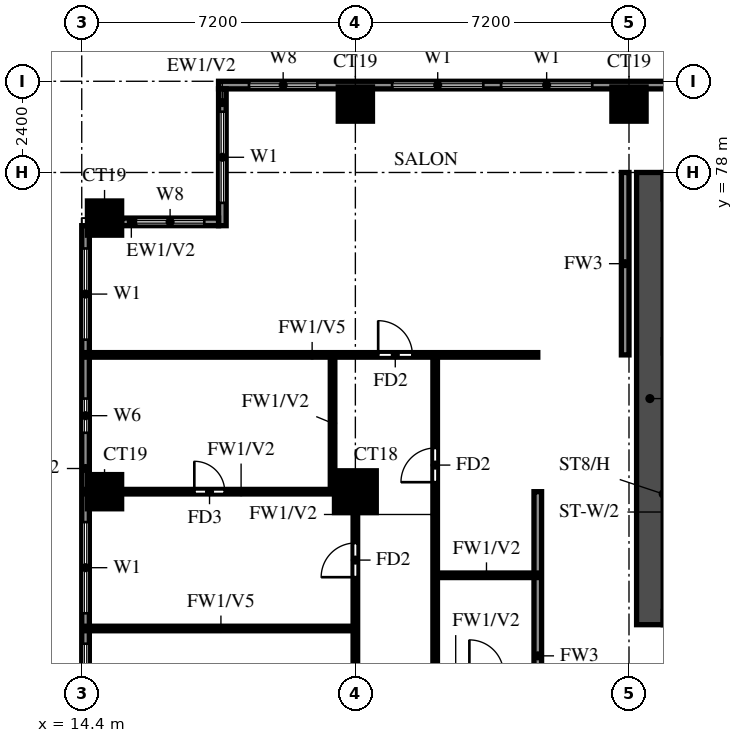
"""IFC4 building model, lengths in metres.
Left out: names, types, materials, properties, quantities, classifications, styles, units other than length and angle.
Written with IfcOpenShell. Run it as: python <this file> out.ifc"""

import sys

from ifc_helpers import new_model, si_unit, direction, frame, frame_2d, origin, origin_2d, place, context, subcontext, project, spatial, rectangle, extrude, source, transform, mapped, element, fill, save


model = new_model("IFC4")
c1 = context("Model", 3, precision=1e-05, world=origin(), true_north=direction((0.0, 1.0)))
c2 = subcontext(c1, "Body", "Model", "MODEL_VIEW")
j1 = project(units=[si_unit("LENGTHUNIT", "METRE"), si_unit("PLANEANGLEUNIT", "RADIAN")], contexts=[c1])
p1 = place(None, origin())
s1 = spatial("IfcSite", under=j1, at=p1, CompositionType="ELEMENT")
p2 = place(p1, origin())
s2 = spatial("IfcBuilding", under=s1, at=p2, CompositionType="ELEMENT")
p3 = place(p2, frame((0.0, 0.0, 120.0)))
s3 = spatial("IfcBuildingStorey", under=s2, at=p3, CompositionType="ELEMENT", Elevation=120.0)
m1 = source(origin(), c2, "Body", "SweptSolid", [
    extrude(rectangle(XDim=0.9, YDim=0.9, at=origin_2d()), origin(), (0.0, 0.0, 1.0), 3.2),
])
p4 = place(p3, frame((15.0, 69.6, 0.0), z_axis=(0.0, 0.0, 1.0), x_axis=(1.0, 0.0, 0.0)))
e1 = element("IfcColumn", 1, at=p4, inside=s3, PredefinedType="COLUMN", context=c2, shape_type="MappedRepresentation", body=[
    mapped(m1, transform((0.0, 0.0, 0.0))),
])
m2 = source(origin(), c2, "Body", "SweptSolid", [
    extrude(rectangle(XDim=1.1, YDim=1.1, at=origin_2d()), origin(), (0.0, 0.0, 1.0), 3.2),
])
p5 = place(p3, frame((21.6, 69.6, 0.0), z_axis=(0.0, 0.0, 1.0), x_axis=(1.0, 0.0, 0.0)))
e2 = element("IfcColumn", 2, at=p5, inside=s3, PredefinedType="COLUMN", context=c2, shape_type="MappedRepresentation", body=[
    mapped(m2, transform((0.0, 0.0, 0.0))),
])
for number, where, z_axis, x_axis in (
    (3, (15.0, 76.8, 0.0), (0.0, 0.0, 1.0), (1.0, 0.0, 0.0)),
    (4, (21.6, 79.8, 0.0), (0.0, 0.0, 1.0), (1.0, 0.0, 0.0)),
    (5, (28.8, 79.8, 0.0), (0.0, 0.0, 1.0), (1.0, 0.0, 0.0)),
):
    element("IfcColumn", number, at=place(p3, frame(where, z_axis=z_axis, x_axis=x_axis)), inside=s3, PredefinedType="COLUMN", context=c2, shape_type="MappedRepresentation", body=[
        mapped(m1, transform((0.0, 0.0, 0.0))),
    ])
p6 = place(p3, frame((29.35, 66.1, 0.0), z_axis=(0.0, 0.0, 1.0), x_axis=(0.0, 1.0, 0.0)))
e6 = element("IfcWall", 6, at=p6, inside=s3, PredefinedType="SHEAR", context=c2, shape_type="SweptSolid", body=[
    extrude(rectangle(XDim=11.9, YDim=0.7, at=frame_2d((5.95, 0.0))), origin(), (0.0, 0.0, 1.0), 3.2),
])
p7 = place(p3, frame((82.6, 80.3, 0.0), z_axis=(0.0, 0.0, 1.0), x_axis=(-1.0, 0.0, 0.0)))
e7 = element("IfcWall", 7, at=p7, inside=s3, PredefinedType="SOLIDWALL", context=c2, shape_type="SweptSolid", body=[
    extrude(rectangle(XDim=64.6, YDim=0.2, at=frame_2d((32.3, 0.0))), origin(), (0.0, 0.0, 1.0), 3.2),
])
p8 = place(p7, frame((7.9, 0.0, 0.0)))
e8 = element("IfcOpeningElement", 8, at=p8, cuts=e7, PredefinedType="OPENING", context=c2, shape_type="SweptSolid", body=[
    extrude(rectangle(XDim=1.8, YDim=2.4, at=frame_2d((0.9, 1.2))), frame((0.0, 0.11, 0.0), z_axis=(0.0, -1.0, 0.0), x_axis=(1.0, 0.0, 0.0)), (0.0, 0.0, 1.0), 0.22),
])
p9 = place(p7, frame((54.767, 0.0, 0.6)))
e9 = element("IfcOpeningElement", 9, at=p9, cuts=e7, PredefinedType="OPENING", context=c2, shape_type="SweptSolid", body=[
    extrude(rectangle(XDim=2.4, YDim=2.4, at=frame_2d((1.2, 1.2))), frame((0.0, 0.11, 0.0), z_axis=(0.0, -1.0, 0.0), x_axis=(1.0, 0.0, 0.0)), (0.0, 0.0, 1.0), 0.22),
])
p10 = place(p7, frame((57.633, 0.0, 0.6)))
e10 = element("IfcOpeningElement", 10, at=p10, cuts=e7, PredefinedType="OPENING", context=c2, shape_type="SweptSolid", body=[
    extrude(rectangle(XDim=2.4, YDim=2.4, at=frame_2d((1.2, 1.2))), frame((0.0, 0.11, 0.0), z_axis=(0.0, -1.0, 0.0), x_axis=(1.0, 0.0, 0.0)), (0.0, 0.0, 1.0), 0.22),
])
p11 = place(p7, frame((62.0, 0.0, 0.6)))
e11 = element("IfcOpeningElement", 11, at=p11, cuts=e7, PredefinedType="OPENING", context=c2, shape_type="SweptSolid", body=[
    extrude(rectangle(XDim=1.8, YDim=2.4, at=frame_2d((0.9, 1.2))), frame((0.0, 0.11, 0.0), z_axis=(0.0, -1.0, 0.0), x_axis=(1.0, 0.0, 0.0)), (0.0, 0.0, 1.0), 0.22),
])
p12 = place(p7, frame((0.7, 0.0, 0.6)))
e12 = element("IfcOpeningElement", 12, at=p12, cuts=e7, PredefinedType="OPENING", context=c2, shape_type="SweptSolid", body=[
    extrude(rectangle(XDim=1.8, YDim=2.4, at=frame_2d((0.9, 1.2))), frame((0.0, 0.11, 0.0), z_axis=(0.0, -1.0, 0.0), x_axis=(1.0, 0.0, 0.0)), (0.0, 0.0, 1.0), 0.22),
])
p13 = place(p7, frame((3.9, 0.0, 0.6)))
e13 = element("IfcOpeningElement", 13, at=p13, cuts=e7, PredefinedType="OPENING", context=c2, shape_type="SweptSolid", body=[
    extrude(rectangle(XDim=1.8, YDim=2.4, at=frame_2d((0.9, 1.2))), frame((0.0, 0.11, 0.0), z_axis=(0.0, -1.0, 0.0), x_axis=(1.0, 0.0, 0.0)), (0.0, 0.0, 1.0), 0.22),
])
p14 = place(p7, frame((6.55, 0.0, 0.6)))
e14 = element("IfcOpeningElement", 14, at=p14, cuts=e7, PredefinedType="OPENING", context=c2, shape_type="SweptSolid", body=[
    extrude(rectangle(XDim=0.9, YDim=2.4, at=frame_2d((0.45, 1.2))), frame((0.0, 0.11, 0.0), z_axis=(0.0, -1.0, 0.0), x_axis=(1.0, 0.0, 0.0)), (0.0, 0.0, 1.0), 0.22),
])
p15 = place(p3, frame((18.1, 80.2, 0.0), z_axis=(0.0, 0.0, 1.0), x_axis=(0.0, -1.0, 0.0)))
e15 = element("IfcWall", 15, at=p15, inside=s3, PredefinedType="SOLIDWALL", context=c2, shape_type="SweptSolid", body=[
    extrude(rectangle(XDim=3.6, YDim=0.2, at=frame_2d((1.8, 0.0))), origin(), (0.0, 0.0, 1.0), 3.2),
])
p16 = place(p15, frame((0.6, 0.0, 0.6)))
e16 = element("IfcOpeningElement", 16, at=p16, cuts=e15, PredefinedType="OPENING", context=c2, shape_type="SweptSolid", body=[
    extrude(rectangle(XDim=2.4, YDim=2.4, at=frame_2d((1.2, 1.2))), frame((0.0, 0.11, 0.0), z_axis=(0.0, -1.0, 0.0), x_axis=(1.0, 0.0, 0.0)), (0.0, 0.0, 1.0), 0.22),
])
p17 = place(p3, frame((18.0, 76.7, 0.0), z_axis=(0.0, 0.0, 1.0), x_axis=(-1.0, 0.0, 0.0)))
e17 = element("IfcWall", 17, at=p17, inside=s3, PredefinedType="SOLIDWALL", context=c2, shape_type="SweptSolid", body=[
    extrude(rectangle(XDim=2.55, YDim=0.2, at=frame_2d((1.275, 0.0))), origin(), (0.0, 0.0, 1.0), 3.2),
])
p18 = place(p17, frame((0.375, 0.0, 0.6)))
e18 = element("IfcOpeningElement", 18, at=p18, cuts=e17, PredefinedType="OPENING", context=c2, shape_type="SweptSolid", body=[
    extrude(rectangle(XDim=1.8, YDim=2.4, at=frame_2d((0.9, 1.2))), frame((0.0, 0.11, 0.0), z_axis=(0.0, -1.0, 0.0), x_axis=(1.0, 0.0, 0.0)), (0.0, 0.0, 1.0), 0.22),
])
p19 = place(p3, frame((14.5, 76.6, 0.0), z_axis=(0.0, 0.0, 1.0), x_axis=(0.0, -1.0, 0.0)))
e19 = element("IfcWall", 19, at=p19, inside=s3, PredefinedType="SOLIDWALL", context=c2, shape_type="SweptSolid", body=[
    extrude(rectangle(XDim=14.2, YDim=0.2, at=frame_2d((7.1, 0.0))), origin(), (0.0, 0.0, 1.0), 3.2),
])
p20 = place(p19, frame((11.0, 0.0, 0.6)))
e20 = element("IfcOpeningElement", 20, at=p20, cuts=e19, PredefinedType="OPENING", context=c2, shape_type="SweptSolid", body=[
    extrude(rectangle(XDim=2.4, YDim=2.4, at=frame_2d((1.2, 1.2))), frame((0.0, 0.11, 0.0), z_axis=(0.0, -1.0, 0.0), x_axis=(1.0, 0.0, 0.0)), (0.0, 0.0, 1.0), 0.22),
])
p21 = place(p19, frame((7.8, 0.0, 0.6)))
e21 = element("IfcOpeningElement", 21, at=p21, cuts=e19, PredefinedType="OPENING", context=c2, shape_type="SweptSolid", body=[
    extrude(rectangle(XDim=2.4, YDim=2.4, at=frame_2d((1.2, 1.2))), frame((0.0, 0.11, 0.0), z_axis=(0.0, -1.0, 0.0), x_axis=(1.0, 0.0, 0.0)), (0.0, 0.0, 1.0), 0.22),
])
p22 = place(p19, frame((4.55, 0.0, 1.5)))
e22 = element("IfcOpeningElement", 22, at=p22, cuts=e19, PredefinedType="OPENING", context=c2, shape_type="SweptSolid", body=[
    extrude(rectangle(XDim=0.9, YDim=0.9, at=frame_2d((0.45, 0.45))), frame((0.0, 0.11, 0.0), z_axis=(0.0, -1.0, 0.0), x_axis=(1.0, 0.0, 0.0)), (0.0, 0.0, 1.0), 0.22),
])
p23 = place(p19, frame((0.6, 0.0, 0.6)))
e23 = element("IfcOpeningElement", 23, at=p23, cuts=e19, PredefinedType="OPENING", context=c2, shape_type="SweptSolid", body=[
    extrude(rectangle(XDim=2.4, YDim=2.4, at=frame_2d((1.2, 1.2))), frame((0.0, 0.11, 0.0), z_axis=(0.0, -1.0, 0.0), x_axis=(1.0, 0.0, 0.0)), (0.0, 0.0, 1.0), 0.22),
])
p24 = place(p3, frame((26.4, 60.0, 0.0), z_axis=(0.0, 0.0, 1.0), x_axis=(0.0, 1.0, 0.0)))
e24 = element("IfcWall", 24, at=p24, inside=s3, PredefinedType="SOLIDWALL", context=c2, shape_type="SweptSolid", body=[
    extrude(rectangle(XDim=9.6, YDim=0.2, at=frame_2d((4.8, 0.0))), origin(), (0.0, 0.0, 1.0), 3.2),
])
p25 = place(p24, frame((0.7, 0.0, 0.0)))
e25 = element("IfcOpeningElement", 25, at=p25, cuts=e24, PredefinedType="OPENING", context=c2, shape_type="SweptSolid", body=[
    extrude(rectangle(XDim=1.0, YDim=2.1, at=frame_2d((0.5, 1.05))), frame((0.0, 0.11, 0.0), z_axis=(0.0, -1.0, 0.0), x_axis=(1.0, 0.0, 0.0)), (0.0, 0.0, 1.0), 0.22),
])
p26 = place(p24, frame((3.1, 0.0, 0.0)))
e26 = element("IfcOpeningElement", 26, at=p26, cuts=e24, PredefinedType="OPENING", context=c2, shape_type="SweptSolid", body=[
    extrude(rectangle(XDim=1.0, YDim=2.1, at=frame_2d((0.5, 1.05))), frame((0.0, 0.11, 0.0), z_axis=(0.0, -1.0, 0.0), x_axis=(1.0, 0.0, 0.0)), (0.0, 0.0, 1.0), 0.22),
])
p27 = place(p3, frame((28.7, 73.2, 0.0), z_axis=(0.0, 0.0, 1.0), x_axis=(0.0, 1.0, 0.0)))
e27 = element("IfcWall", 27, at=p27, inside=s3, PredefinedType="SOLIDWALL", context=c2, shape_type="SweptSolid", body=[
    extrude(rectangle(XDim=4.8, YDim=0.2, at=frame_2d((2.4, 0.0))), origin(), (0.0, 0.0, 1.0), 3.2),
])
p28 = place(p3, frame((14.525, 66.0, 0.0), z_axis=(0.0, 0.0, 1.0), x_axis=(1.0, 0.0, 0.0)))
e28 = element("IfcWall", 28, at=p28, inside=s3, PredefinedType="PARTITIONING", context=c2, shape_type="SweptSolid", body=[
    extrude(rectangle(XDim=7.075, YDim=0.12, at=frame_2d((3.538, 0.0))), origin(), (0.0, 0.0, 1.0), 2.3),
])
p29 = place(p3, frame((23.7, 67.4, 0.0), z_axis=(0.0, 0.0, 1.0), x_axis=(1.0, 0.0, 0.0)))
e29 = element("IfcWall", 29, at=p29, inside=s3, PredefinedType="PARTITIONING", context=c2, shape_type="SweptSolid", body=[
    extrude(rectangle(XDim=2.7, YDim=0.12, at=frame_2d((1.35, 0.0))), origin(), (0.0, 0.0, 1.0), 3.2),
])
p30 = place(p3, frame((14.525, 69.6, 0.0), z_axis=(0.0, 0.0, 1.0), x_axis=(1.0, 0.0, 0.0)))
e30 = element("IfcWall", 30, at=p30, inside=s3, PredefinedType="PARTITIONING", context=c2, shape_type="SweptSolid", body=[
    extrude(rectangle(XDim=7.075, YDim=0.12, at=frame_2d((3.538, 0.0))), origin(), (0.0, 0.0, 1.0), 3.2),
])
p31 = place(p30, frame((2.837, 0.0, 0.0)))
e31 = element("IfcOpeningElement", 31, at=p31, cuts=e30, PredefinedType="OPENING", context=c2, shape_type="SweptSolid", body=[
    extrude(rectangle(XDim=0.8, YDim=2.1, at=frame_2d((0.4, 1.05))), frame((0.0, 0.07, 0.0), z_axis=(0.0, -1.0, 0.0), x_axis=(1.0, 0.0, 0.0)), (0.0, 0.0, 1.0), 0.14),
])
p32 = place(p3, frame((14.525, 73.2, 0.0), z_axis=(0.0, 0.0, 1.0), x_axis=(1.0, 0.0, 0.0)))
e32 = element("IfcWall", 32, at=p32, inside=s3, PredefinedType="PARTITIONING", context=c2, shape_type="SweptSolid", body=[
    extrude(rectangle(XDim=11.875, YDim=0.12, at=frame_2d((5.938, 0.0))), origin(), (0.0, 0.0, 1.0), 2.3),
])
p33 = place(p32, frame((7.675, 0.0, 0.0)))
e33 = element("IfcOpeningElement", 33, at=p33, cuts=e32, PredefinedType="OPENING", context=c2, shape_type="SweptSolid", body=[
    extrude(rectangle(XDim=0.9, YDim=2.1, at=frame_2d((0.45, 1.05))), frame((0.0, 0.07, 0.0), z_axis=(0.0, -1.0, 0.0), x_axis=(1.0, 0.0, 0.0)), (0.0, 0.0, 1.0), 0.14),
])
p34 = place(p3, frame((21.0, 69.6, 0.0), z_axis=(0.0, 0.0, 1.0), x_axis=(0.0, 1.0, 0.0)))
e34 = element("IfcWall", 34, at=p34, inside=s3, PredefinedType="PARTITIONING", context=c2, shape_type="SweptSolid", body=[
    extrude(rectangle(XDim=3.6, YDim=0.12, at=frame_2d((1.8, 0.0))), origin(), (0.0, 0.0, 1.0), 3.2),
])
p35 = place(p3, frame((21.6, 48.0, 0.0), z_axis=(0.0, 0.0, 1.0), x_axis=(0.0, 1.0, 0.0)))
e35 = element("IfcWall", 35, at=p35, inside=s3, PredefinedType="PARTITIONING", context=c2, shape_type="SweptSolid", body=[
    extrude(rectangle(XDim=21.6, YDim=0.12, at=frame_2d((10.8, 0.0))), origin(), (0.0, 0.0, 1.0), 3.2),
])
p36 = place(p35, frame((1.35, 0.0, 0.0)))
e36 = element("IfcOpeningElement", 36, at=p36, cuts=e35, PredefinedType="OPENING", context=c2, shape_type="SweptSolid", body=[
    extrude(rectangle(XDim=0.9, YDim=2.1, at=frame_2d((0.45, 1.05))), frame((0.0, 0.07, 0.0), z_axis=(0.0, -1.0, 0.0), x_axis=(1.0, 0.0, 0.0)), (0.0, 0.0, 1.0), 0.14),
])
p37 = place(p35, frame((7.95, 0.0, 0.0)))
e37 = element("IfcOpeningElement", 37, at=p37, cuts=e35, PredefinedType="OPENING", context=c2, shape_type="SweptSolid", body=[
    extrude(rectangle(XDim=1.5, YDim=2.1, at=frame_2d((0.75, 1.05))), frame((0.0, 0.07, 0.0), z_axis=(0.0, -1.0, 0.0), x_axis=(1.0, 0.0, 0.0)), (0.0, 0.0, 1.0), 0.14),
])
p38 = place(p35, frame((12.15, 0.0, 0.0)))
e38 = element("IfcOpeningElement", 38, at=p38, cuts=e35, PredefinedType="OPENING", context=c2, shape_type="SweptSolid", body=[
    extrude(rectangle(XDim=0.9, YDim=2.1, at=frame_2d((0.45, 1.05))), frame((0.0, 0.07, 0.0), z_axis=(0.0, -1.0, 0.0), x_axis=(1.0, 0.0, 0.0)), (0.0, 0.0, 1.0), 0.14),
])
p39 = place(p35, frame((15.75, 0.0, 0.0)))
e39 = element("IfcOpeningElement", 39, at=p39, cuts=e35, PredefinedType="OPENING", context=c2, shape_type="SweptSolid", body=[
    extrude(rectangle(XDim=0.9, YDim=2.1, at=frame_2d((0.45, 1.05))), frame((0.0, 0.07, 0.0), z_axis=(0.0, -1.0, 0.0), x_axis=(1.0, 0.0, 0.0)), (0.0, 0.0, 1.0), 0.14),
])
p40 = place(p35, frame((19.35, 0.0, 0.0)))
e40 = element("IfcOpeningElement", 40, at=p40, cuts=e35, PredefinedType="OPENING", context=c2, shape_type="SweptSolid", body=[
    extrude(rectangle(XDim=0.9, YDim=2.1, at=frame_2d((0.45, 1.05))), frame((0.0, 0.07, 0.0), z_axis=(0.0, -1.0, 0.0), x_axis=(1.0, 0.0, 0.0)), (0.0, 0.0, 1.0), 0.14),
])
p41 = place(p3, frame((23.7, 64.8, 0.0), z_axis=(0.0, 0.0, 1.0), x_axis=(0.0, 1.0, 0.0)))
e41 = element("IfcWall", 41, at=p41, inside=s3, PredefinedType="PARTITIONING", context=c2, shape_type="SweptSolid", body=[
    extrude(rectangle(XDim=8.4, YDim=0.12, at=frame_2d((4.2, 0.0))), origin(), (0.0, 0.0, 1.0), 3.2),
])
p42 = place(p41, frame((5.05, 0.0, 0.0)))
e42 = element("IfcOpeningElement", 42, at=p42, cuts=e41, PredefinedType="OPENING", context=c2, shape_type="SweptSolid", body=[
    extrude(rectangle(XDim=0.9, YDim=2.1, at=frame_2d((0.45, 1.05))), frame((0.0, 0.07, 0.0), z_axis=(0.0, -1.0, 0.0), x_axis=(1.0, 0.0, 0.0)), (0.0, 0.0, 1.0), 0.14),
])
p43 = place(p9, origin())
e43 = element("IfcWindow", 43, at=p43, inside=s3, PartitioningType="DOUBLE_PANEL_VERTICAL", PredefinedType="WINDOW", context=c2, shape_type="SweptSolid", body=[
    extrude(rectangle(XDim=2.4, YDim=2.4, at=frame_2d((1.2, 1.2))), frame((0.0, 0.03, 0.0), z_axis=(0.0, -1.0, 0.0), x_axis=(1.0, 0.0, 0.0)), (0.0, 0.0, 1.0), 0.06),
])
fill(e9, e43)
p44 = place(p10, origin())
e44 = element("IfcWindow", 44, at=p44, inside=s3, PartitioningType="DOUBLE_PANEL_VERTICAL", PredefinedType="WINDOW", context=c2, shape_type="SweptSolid", body=[
    extrude(rectangle(XDim=2.4, YDim=2.4, at=frame_2d((1.2, 1.2))), frame((0.0, 0.03, 0.0), z_axis=(0.0, -1.0, 0.0), x_axis=(1.0, 0.0, 0.0)), (0.0, 0.0, 1.0), 0.06),
])
fill(e10, e44)
p45 = place(p11, origin())
e45 = element("IfcWindow", 45, at=p45, inside=s3, PartitioningType="DOUBLE_PANEL_VERTICAL", PredefinedType="WINDOW", context=c2, shape_type="SweptSolid", body=[
    extrude(rectangle(XDim=1.8, YDim=2.4, at=frame_2d((0.9, 1.2))), frame((0.0, 0.03, 0.0), z_axis=(0.0, -1.0, 0.0), x_axis=(1.0, 0.0, 0.0)), (0.0, 0.0, 1.0), 0.06),
])
fill(e11, e45)
p46 = place(p16, origin())
e46 = element("IfcWindow", 46, at=p46, inside=s3, PartitioningType="DOUBLE_PANEL_VERTICAL", PredefinedType="WINDOW", context=c2, shape_type="SweptSolid", body=[
    extrude(rectangle(XDim=2.4, YDim=2.4, at=frame_2d((1.2, 1.2))), frame((0.0, 0.03, 0.0), z_axis=(0.0, -1.0, 0.0), x_axis=(1.0, 0.0, 0.0)), (0.0, 0.0, 1.0), 0.06),
])
fill(e16, e46)
p47 = place(p18, origin())
e47 = element("IfcWindow", 47, at=p47, inside=s3, PartitioningType="DOUBLE_PANEL_VERTICAL", PredefinedType="WINDOW", context=c2, shape_type="SweptSolid", body=[
    extrude(rectangle(XDim=1.8, YDim=2.4, at=frame_2d((0.9, 1.2))), frame((0.0, 0.03, 0.0), z_axis=(0.0, -1.0, 0.0), x_axis=(1.0, 0.0, 0.0)), (0.0, 0.0, 1.0), 0.06),
])
fill(e18, e47)
p48 = place(p20, origin())
e48 = element("IfcWindow", 48, at=p48, inside=s3, PartitioningType="DOUBLE_PANEL_VERTICAL", PredefinedType="WINDOW", context=c2, shape_type="SweptSolid", body=[
    extrude(rectangle(XDim=2.4, YDim=2.4, at=frame_2d((1.2, 1.2))), frame((0.0, 0.03, 0.0), z_axis=(0.0, -1.0, 0.0), x_axis=(1.0, 0.0, 0.0)), (0.0, 0.0, 1.0), 0.06),
])
fill(e20, e48)
p49 = place(p21, origin())
e49 = element("IfcWindow", 49, at=p49, inside=s3, PartitioningType="DOUBLE_PANEL_VERTICAL", PredefinedType="WINDOW", context=c2, shape_type="SweptSolid", body=[
    extrude(rectangle(XDim=2.4, YDim=2.4, at=frame_2d((1.2, 1.2))), frame((0.0, 0.03, 0.0), z_axis=(0.0, -1.0, 0.0), x_axis=(1.0, 0.0, 0.0)), (0.0, 0.0, 1.0), 0.06),
])
fill(e21, e49)
p50 = place(p22, origin())
e50 = element("IfcWindow", 50, at=p50, inside=s3, PartitioningType="SINGLE_PANEL", PredefinedType="WINDOW", context=c2, shape_type="SweptSolid", body=[
    extrude(rectangle(XDim=0.9, YDim=0.9, at=frame_2d((0.45, 0.45))), frame((0.0, 0.03, 0.0), z_axis=(0.0, -1.0, 0.0), x_axis=(1.0, 0.0, 0.0)), (0.0, 0.0, 1.0), 0.06),
])
fill(e22, e50)
p51 = place(p23, origin())
e51 = element("IfcWindow", 51, at=p51, inside=s3, PartitioningType="DOUBLE_PANEL_VERTICAL", PredefinedType="WINDOW", context=c2, shape_type="SweptSolid", body=[
    extrude(rectangle(XDim=2.4, YDim=2.4, at=frame_2d((1.2, 1.2))), frame((0.0, 0.03, 0.0), z_axis=(0.0, -1.0, 0.0), x_axis=(1.0, 0.0, 0.0)), (0.0, 0.0, 1.0), 0.06),
])
fill(e23, e51)
p52 = place(p40, origin())
e52 = element("IfcDoor", 52, at=p52, inside=s3, OperationType="SINGLE_SWING_RIGHT", PredefinedType="DOOR", context=c2, shape_type="SweptSolid", body=[
    extrude(rectangle(XDim=0.9, YDim=2.1, at=frame_2d((0.45, 1.05))), frame((0.0, 0.025, 0.0), z_axis=(0.0, -1.0, 0.0), x_axis=(1.0, 0.0, 0.0)), (0.0, 0.0, 1.0), 0.05),
])
fill(e40, e52)
p53 = place(p31, origin())
e53 = element("IfcDoor", 53, at=p53, inside=s3, OperationType="SINGLE_SWING_LEFT", PredefinedType="DOOR", context=c2, shape_type="SweptSolid", body=[
    extrude(rectangle(XDim=0.8, YDim=2.1, at=frame_2d((0.4, 1.05))), frame((0.0, 0.025, 0.0), z_axis=(0.0, -1.0, 0.0), x_axis=(1.0, 0.0, 0.0)), (0.0, 0.0, 1.0), 0.05),
])
fill(e31, e53)
p54 = place(p33, origin())
e54 = element("IfcDoor", 54, at=p54, inside=s3, OperationType="SINGLE_SWING_LEFT", PredefinedType="DOOR", context=c2, shape_type="SweptSolid", body=[
    extrude(rectangle(XDim=0.9, YDim=2.1, at=frame_2d((0.45, 1.05))), frame((0.0, 0.025, 0.0), z_axis=(0.0, -1.0, 0.0), x_axis=(1.0, 0.0, 0.0)), (0.0, 0.0, 1.0), 0.05),
])
fill(e33, e54)
p55 = place(p42, origin())
e55 = element("IfcDoor", 55, at=p55, inside=s3, OperationType="SINGLE_SWING_LEFT", PredefinedType="DOOR", context=c2, shape_type="SweptSolid", body=[
    extrude(rectangle(XDim=0.9, YDim=2.1, at=frame_2d((0.45, 1.05))), frame((0.0, 0.025, 0.0), z_axis=(0.0, -1.0, 0.0), x_axis=(1.0, 0.0, 0.0)), (0.0, 0.0, 1.0), 0.05),
])
fill(e42, e55)
save(model, sys.argv[1])
